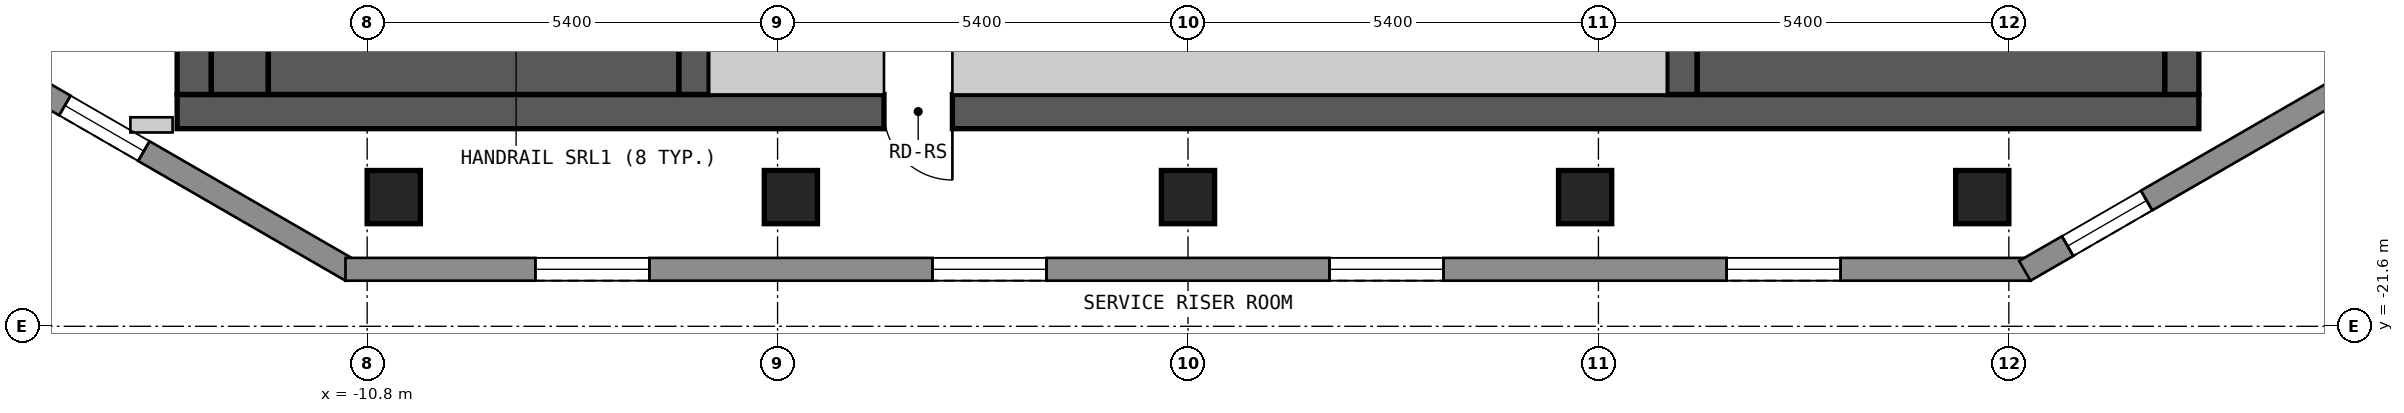
"""IFC4 building model, lengths in metres.
Left out: names, types, materials, properties, quantities, classifications, styles, units other than length and angle.
Written with IfcOpenShell. Run it as: python <this file> out.ifc"""

import sys

from ifc_helpers import new_model, si_unit, direction, frame, frame_2d, origin, origin_2d, place, context, subcontext, project, spatial, polyline, rectangle, outline, extrude, element, fill, save


model = new_model("IFC4")
c1 = context("Model", 3, precision=1e-05, world=origin(), true_north=direction((0.0, 1.0)))
c2 = subcontext(c1, "Body", "Model", "MODEL_VIEW")
j1 = project(units=[si_unit("LENGTHUNIT", "METRE"), si_unit("PLANEANGLEUNIT", "RADIAN")], contexts=[c1])
p1 = place(None, origin())
s1 = spatial("IfcSite", under=j1, at=p1, CompositionType="ELEMENT")
p2 = place(p1, origin())
s2 = spatial("IfcBuilding", under=s1, at=p2, CompositionType="ELEMENT")
p3 = place(p2, frame((0.0, 0.0, 223.8)))
s3 = spatial("IfcBuildingStorey", under=s2, at=p3, CompositionType="ELEMENT", Elevation=223.8)
for number, where, z_axis, x_axis in (
    (1, (-10.45, -19.9, 0.0), (0.0, 0.0, 1.0), (1.0, 0.0, 0.0)),
    (2, (-5.225, -19.9, 0.0), (0.0, 0.0, 1.0), (1.0, 0.0, 0.0)),
    (3, (0.0, -19.9, 0.0), (0.0, 0.0, 1.0), (1.0, 0.0, 0.0)),
    (4, (5.225, -19.9, 0.0), (0.0, 0.0, 1.0), (1.0, 0.0, 0.0)),
    (5, (10.45, -19.9, 0.0), (0.0, 0.0, 1.0), (1.0, 0.0, 0.0)),
):
    element("IfcColumn", number, at=place(p3, frame(where, z_axis=z_axis, x_axis=x_axis)), inside=s3, PredefinedType="COLUMN", context=c2, shape_type="SweptSolid", body=[
        extrude(rectangle(XDim=0.7, YDim=0.7, at=origin_2d()), origin(), (0.0, 0.0, 1.0), 3.0),
    ])
p4 = place(p3, frame((-13.3, -18.775, 0.0), z_axis=(0.0, 0.0, 1.0), x_axis=(1.0, 0.0, 0.0)))
e6 = element("IfcWall", 6, at=p4, inside=s3, PredefinedType="SHEAR", context=c2, shape_type="SweptSolid", body=[
    extrude(rectangle(XDim=26.6, YDim=0.45, at=frame_2d((13.3, 0.0))), origin(), (0.0, 0.0, 1.0), 2.7),
])
p5 = place(p4, frame((9.3, 0.0, 0.0)))
e7 = element("IfcOpeningElement", 7, at=p5, cuts=e6, PredefinedType="OPENING", context=c2, shape_type="SweptSolid", body=[
    extrude(rectangle(XDim=0.9, YDim=2.1, at=frame_2d((0.45, 1.05))), frame((0.0, 0.235, 0.0), z_axis=(0.0, -1.0, 0.0), x_axis=(1.0, 0.0, 0.0)), (0.0, 0.0, 1.0), 0.47),
])
p6 = place(p3, frame((-13.075, -18.55, 0.0), z_axis=(0.0, 0.0, 1.0), x_axis=(0.0, 1.0, 0.0)))
e8 = element("IfcWall", 8, at=p6, inside=s3, PredefinedType="SHEAR", context=c2, shape_type="SweptSolid", body=[
    extrude(rectangle(XDim=13.1, YDim=0.45, at=frame_2d((6.55, 0.0))), origin(), (0.0, 0.0, 1.0), 2.7),
])
p7 = place(p6, frame((4.35, 0.0, 0.0)))
e9 = element("IfcOpeningElement", 9, at=p7, cuts=e8, PredefinedType="OPENING", context=c2, shape_type="SweptSolid", body=[
    extrude(rectangle(XDim=1.2, YDim=2.1, at=frame_2d((0.6, 1.05))), frame((0.0, 0.235, 0.0), z_axis=(0.0, -1.0, 0.0), x_axis=(1.0, 0.0, 0.0)), (0.0, 0.0, 1.0), 0.47),
])
p8 = place(p3, frame((13.075, -18.55, 0.0), z_axis=(0.0, 0.0, 1.0), x_axis=(0.0, 1.0, 0.0)))
e10 = element("IfcWall", 10, at=p8, inside=s3, PredefinedType="SHEAR", context=c2, shape_type="SweptSolid", body=[
    extrude(rectangle(XDim=13.1, YDim=0.45, at=frame_2d((6.55, 0.0))), origin(), (0.0, 0.0, 1.0), 2.7),
])
for number, where, z_axis, x_axis in (
    (11, (-6.5, -18.55, 0.0), (0.0, 0.0, 1.0), (0.0, 1.0, 0.0)),
    (12, (6.5, -18.55, 0.0), (0.0, 0.0, 1.0), (0.0, 1.0, 0.0)),
):
    element("IfcWall", number, at=place(p3, frame(where, z_axis=z_axis, x_axis=x_axis)), inside=s3, PredefinedType="SHEAR", context=c2, shape_type="SweptSolid", body=[
        extrude(rectangle(XDim=3.7, YDim=0.4, at=frame_2d((1.85, 0.0))), origin(), (0.0, 0.0, 1.0), 2.7),
    ])
p9 = place(p3, frame((-15.34, -18.37, 0.0), z_axis=(0.0, 0.0, 1.0), x_axis=(0.866022959057, -0.500004234368, 0.0)))
e13 = element("IfcWall", 13, at=p9, inside=s3, PredefinedType="SOLIDWALL", context=c2, shape_type="SweptSolid", body=[
    extrude(outline(polyline([(0.0, -0.15), (5.0, -0.15), (4.92, 0.15), (0.08, 0.15), (0.0, -0.15)])), origin(), (0.0, 0.0, 1.0), 2.7),
])
p10 = place(p9, frame((0.65, 0.0, 0.15)))
e14 = element("IfcOpeningElement", 14, at=p10, cuts=e13, PredefinedType="OPENING", context=c2, shape_type="SweptSolid", body=[
    extrude(rectangle(XDim=1.2, YDim=2.1, at=frame_2d((0.6, 1.05))), frame((0.0, 0.16, 0.0), z_axis=(0.0, -1.0, 0.0), x_axis=(1.0, 0.0, 0.0)), (0.0, 0.0, 1.0), 0.32),
])
p11 = place(p3, frame((-11.085, -20.85, 0.0), z_axis=(0.0, 0.0, 1.0), x_axis=(1.0, 0.0, 0.0)))
e15 = element("IfcWall", 15, at=p11, inside=s3, PredefinedType="SOLIDWALL", context=c2, shape_type="SweptSolid", body=[
    extrude(outline(polyline([(0.0, -0.15), (22.17, -0.15), (22.09, 0.15), (0.08, 0.15), (0.0, -0.15)])), origin(), (0.0, 0.0, 1.0), 2.7),
])
p12 = place(p11, frame((2.498, 0.0, 0.15)))
e16 = element("IfcOpeningElement", 16, at=p12, cuts=e15, PredefinedType="OPENING", context=c2, shape_type="SweptSolid", body=[
    extrude(rectangle(XDim=1.5, YDim=2.1, at=frame_2d((0.75, 1.05))), frame((0.0, 0.16, 0.0), z_axis=(0.0, -1.0, 0.0), x_axis=(1.0, 0.0, 0.0)), (0.0, 0.0, 1.0), 0.32),
])
p13 = place(p11, frame((7.723, 0.0, 0.15)))
e17 = element("IfcOpeningElement", 17, at=p13, cuts=e15, PredefinedType="OPENING", context=c2, shape_type="SweptSolid", body=[
    extrude(rectangle(XDim=1.5, YDim=2.1, at=frame_2d((0.75, 1.05))), frame((0.0, 0.16, 0.0), z_axis=(0.0, -1.0, 0.0), x_axis=(1.0, 0.0, 0.0)), (0.0, 0.0, 1.0), 0.32),
])
p14 = place(p11, frame((12.947, 0.0, 0.15)))
e18 = element("IfcOpeningElement", 18, at=p14, cuts=e15, PredefinedType="OPENING", context=c2, shape_type="SweptSolid", body=[
    extrude(rectangle(XDim=1.5, YDim=2.1, at=frame_2d((0.75, 1.05))), frame((0.0, 0.16, 0.0), z_axis=(0.0, -1.0, 0.0), x_axis=(1.0, 0.0, 0.0)), (0.0, 0.0, 1.0), 0.32),
])
p15 = place(p11, frame((18.172, 0.0, 0.15)))
e19 = element("IfcOpeningElement", 19, at=p15, cuts=e15, PredefinedType="OPENING", context=c2, shape_type="SweptSolid", body=[
    extrude(rectangle(XDim=1.5, YDim=2.1, at=frame_2d((0.75, 1.05))), frame((0.0, 0.16, 0.0), z_axis=(0.0, -1.0, 0.0), x_axis=(1.0, 0.0, 0.0)), (0.0, 0.0, 1.0), 0.32),
])
p16 = place(p3, frame((11.01, -20.87, 0.0), z_axis=(0.0, 0.0, 1.0), x_axis=(0.866022959057, 0.500004234368, 0.0)))
e20 = element("IfcWall", 20, at=p16, inside=s3, PredefinedType="SOLIDWALL", context=c2, shape_type="SweptSolid", body=[
    extrude(outline(polyline([(0.0, -0.15), (5.0, -0.15), (4.92, 0.15), (0.08, 0.15), (0.0, -0.15)])), origin(), (0.0, 0.0, 1.0), 2.7),
])
p17 = place(p16, frame((0.65, 0.0, 0.15)))
e21 = element("IfcOpeningElement", 21, at=p17, cuts=e20, PredefinedType="OPENING", context=c2, shape_type="SweptSolid", body=[
    extrude(rectangle(XDim=1.2, YDim=2.1, at=frame_2d((0.6, 1.05))), frame((0.0, 0.16, 0.0), z_axis=(0.0, -1.0, 0.0), x_axis=(1.0, 0.0, 0.0)), (0.0, 0.0, 1.0), 0.32),
])
p18 = place(p3, frame((-13.915, -18.95, 0.0), z_axis=(0.0, 0.0, 1.0), x_axis=(1.0, 0.0, 0.0)))
e22 = element("IfcWall", 22, at=p18, inside=s3, PredefinedType="PARTITIONING", context=c2, shape_type="SweptSolid", body=[
    extrude(rectangle(XDim=0.555, YDim=0.2, at=frame_2d((0.277, 0.0))), origin(), (0.0, 0.0, 1.0), 2.7),
])
p19 = place(p3, frame((-12.475, -18.55, 0.0), z_axis=(0.0, 0.0, 1.0), x_axis=(0.0, 1.0, 0.0)))
e23 = element("IfcWall", 23, at=p19, inside=s3, PredefinedType="SOLIDWALL", context=c2, shape_type="SweptSolid", body=[
    extrude(rectangle(XDim=3.7, YDim=0.75, at=frame_2d((1.85, 0.0))), origin(), (0.0, 0.0, 1.0), 2.7),
])
p20 = place(p3, frame((-12.1, -18.175, 0.0), z_axis=(0.0, 0.0, 1.0), x_axis=(1.0, 0.0, 0.0)))
e24 = element("IfcWall", 24, at=p20, inside=s3, PredefinedType="SOLIDWALL", context=c2, shape_type="SweptSolid", body=[
    extrude(rectangle(XDim=5.4, YDim=0.75, at=frame_2d((2.7, 0.0))), origin(), (0.0, 0.0, 1.0), 2.7),
])
p21 = place(p3, frame((-6.3, -18.175, 0.0), z_axis=(0.0, 0.0, 1.0), x_axis=(1.0, 0.0, 0.0)))
e25 = element("IfcWall", 25, at=p21, inside=s3, PredefinedType="PARTITIONING", context=c2, shape_type="SweptSolid", body=[
    extrude(rectangle(XDim=2.3, YDim=0.75, at=frame_2d((1.15, 0.0))), origin(), (0.0, 0.0, 1.0), 2.7),
])
p22 = place(p3, frame((-3.1, -18.175, 0.0), z_axis=(0.0, 0.0, 1.0), x_axis=(1.0, 0.0, 0.0)))
e26 = element("IfcWall", 26, at=p22, inside=s3, PredefinedType="PARTITIONING", context=c2, shape_type="SweptSolid", body=[
    extrude(rectangle(XDim=9.4, YDim=0.75, at=frame_2d((4.7, 0.0))), origin(), (0.0, 0.0, 1.0), 2.7),
])
p23 = place(p3, frame((6.7, -18.075, 0.0), z_axis=(0.0, 0.0, 1.0), x_axis=(1.0, 0.0, 0.0)))
e27 = element("IfcWall", 27, at=p23, inside=s3, PredefinedType="SOLIDWALL", context=c2, shape_type="SweptSolid", body=[
    extrude(rectangle(XDim=6.15, YDim=0.95, at=frame_2d((3.075, 0.0))), origin(), (0.0, 0.0, 1.0), 2.7),
])
p24 = place(p10, origin())
e28 = element("IfcWindow", 28, at=p24, inside=s3, PartitioningType="SINGLE_PANEL", PredefinedType="WINDOW", context=c2, shape_type="SweptSolid", body=[
    extrude(rectangle(XDim=1.2, YDim=2.1, at=frame_2d((0.6, 1.05))), frame((0.0, 0.03, 0.0), z_axis=(0.0, -1.0, 0.0), x_axis=(1.0, 0.0, 0.0)), (0.0, 0.0, 1.0), 0.06),
])
fill(e14, e28)
p25 = place(p12, origin())
e29 = element("IfcWindow", 29, at=p25, inside=s3, PartitioningType="SINGLE_PANEL", PredefinedType="WINDOW", context=c2, shape_type="SweptSolid", body=[
    extrude(rectangle(XDim=1.5, YDim=2.1, at=frame_2d((0.75, 1.05))), frame((0.0, 0.03, 0.0), z_axis=(0.0, -1.0, 0.0), x_axis=(1.0, 0.0, 0.0)), (0.0, 0.0, 1.0), 0.06),
])
fill(e16, e29)
p26 = place(p13, origin())
e30 = element("IfcWindow", 30, at=p26, inside=s3, PartitioningType="SINGLE_PANEL", PredefinedType="WINDOW", context=c2, shape_type="SweptSolid", body=[
    extrude(rectangle(XDim=1.5, YDim=2.1, at=frame_2d((0.75, 1.05))), frame((0.0, 0.03, 0.0), z_axis=(0.0, -1.0, 0.0), x_axis=(1.0, 0.0, 0.0)), (0.0, 0.0, 1.0), 0.06),
])
fill(e17, e30)
p27 = place(p14, origin())
e31 = element("IfcWindow", 31, at=p27, inside=s3, PartitioningType="SINGLE_PANEL", PredefinedType="WINDOW", context=c2, shape_type="SweptSolid", body=[
    extrude(rectangle(XDim=1.5, YDim=2.1, at=frame_2d((0.75, 1.05))), frame((0.0, 0.03, 0.0), z_axis=(0.0, -1.0, 0.0), x_axis=(1.0, 0.0, 0.0)), (0.0, 0.0, 1.0), 0.06),
])
fill(e18, e31)
p28 = place(p15, origin())
e32 = element("IfcWindow", 32, at=p28, inside=s3, PartitioningType="SINGLE_PANEL", PredefinedType="WINDOW", context=c2, shape_type="SweptSolid", body=[
    extrude(rectangle(XDim=1.5, YDim=2.1, at=frame_2d((0.75, 1.05))), frame((0.0, 0.03, 0.0), z_axis=(0.0, -1.0, 0.0), x_axis=(1.0, 0.0, 0.0)), (0.0, 0.0, 1.0), 0.06),
])
fill(e19, e32)
p29 = place(p17, origin())
e33 = element("IfcWindow", 33, at=p29, inside=s3, PartitioningType="SINGLE_PANEL", PredefinedType="WINDOW", context=c2, shape_type="SweptSolid", body=[
    extrude(rectangle(XDim=1.2, YDim=2.1, at=frame_2d((0.6, 1.05))), frame((0.0, 0.03, 0.0), z_axis=(0.0, -1.0, 0.0), x_axis=(1.0, 0.0, 0.0)), (0.0, 0.0, 1.0), 0.06),
])
fill(e21, e33)
p30 = place(p5, origin())
e34 = element("IfcDoor", 34, at=p30, inside=s3, OperationType="SINGLE_SWING_RIGHT", PredefinedType="DOOR", context=c2, shape_type="SweptSolid", body=[
    extrude(rectangle(XDim=0.9, YDim=2.1, at=frame_2d((0.45, 1.05))), frame((0.0, 0.025, 0.0), z_axis=(0.0, -1.0, 0.0), x_axis=(1.0, 0.0, 0.0)), (0.0, 0.0, 1.0), 0.05),
])
fill(e7, e34)
save(model, sys.argv[1])
